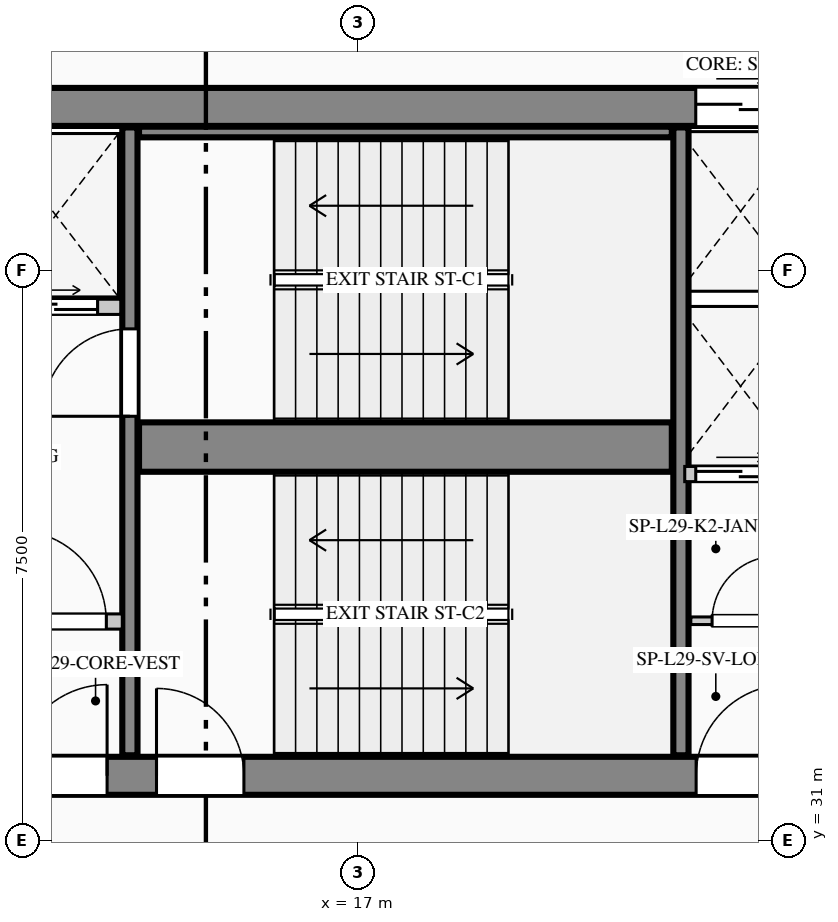
"""IFC4 building model, lengths in metres.
Left out: names, types, materials, properties, quantities, classifications, styles, units other than length and angle.
Written with IfcOpenShell. Run it as: python <this file> out.ifc"""

import sys

from ifc_helpers import new_model, si_unit, direction, frame, frame_2d, origin, place, context, subcontext, project, spatial, rectangle, extrude, element, fill, save


model = new_model("IFC4")
c1 = context("Model", 3, precision=1e-05, world=origin(), true_north=direction((0.0, 1.0)))
c2 = subcontext(c1, "Body", "Model", "MODEL_VIEW")
j1 = project(units=[si_unit("LENGTHUNIT", "METRE"), si_unit("PLANEANGLEUNIT", "RADIAN")], contexts=[c1])
p1 = place(None, origin())
s1 = spatial("IfcSite", under=j1, at=p1, CompositionType="ELEMENT")
p2 = place(p1, origin())
s2 = spatial("IfcBuilding", under=s1, at=p2, CompositionType="ELEMENT")
p3 = place(p2, frame((0.0, 0.0, 127.2)))
s3 = spatial("IfcBuildingStorey", under=s2, at=p3, CompositionType="ELEMENT", Elevation=127.2)
p4 = place(p3, frame((5.5, 40.65, 0.0), z_axis=(0.0, 0.0, 1.0), x_axis=(1.0, 0.0, 0.0)))
e1 = element("IfcWall", 1, at=p4, inside=s3, PredefinedType="SHEAR", context=c2, shape_type="SweptSolid", body=[
    extrude(rectangle(XDim=17.85, YDim=0.5, at=frame_2d((8.925, 0.0))), origin(), (0.0, 0.0, 1.0), 3.95),
])
p5 = place(p4, frame((15.945, 0.0, 0.0)))
e2 = element("IfcOpeningElement", 2, at=p5, cuts=e1, PredefinedType="OPENING", context=c2, shape_type="SweptSolid", body=[
    extrude(rectangle(XDim=1.18, YDim=2.25, at=frame_2d((0.59, 1.125))), frame((0.0, 0.26, 0.0), z_axis=(0.0, -1.0, 0.0), x_axis=(1.0, 0.0, 0.0)), (0.0, 0.0, 1.0), 0.52),
])
p6 = place(p3, frame((5.5, 31.85, 0.0), z_axis=(0.0, 0.0, 1.0), x_axis=(1.0, 0.0, 0.0)))
e3 = element("IfcWall", 3, at=p6, inside=s3, PredefinedType="SHEAR", context=c2, shape_type="SweptSolid", body=[
    extrude(rectangle(XDim=17.85, YDim=0.5, at=frame_2d((8.925, 0.0))), origin(), (0.0, 0.0, 1.0), 3.95),
])
p7 = place(p6, frame((3.15, 0.0, 0.0)))
e4 = element("IfcOpeningElement", 4, at=p7, cuts=e3, PredefinedType="OPENING", context=c2, shape_type="SweptSolid", body=[
    extrude(rectangle(XDim=1.2, YDim=2.2, at=frame_2d((0.6, 1.1))), frame((0.0, 0.26, 0.0), z_axis=(0.0, -1.0, 0.0), x_axis=(1.0, 0.0, 0.0)), (0.0, 0.0, 1.0), 0.52),
])
p8 = place(p6, frame((7.0, 0.0, 0.0)))
e5 = element("IfcOpeningElement", 5, at=p8, cuts=e3, PredefinedType="OPENING", context=c2, shape_type="SweptSolid", body=[
    extrude(rectangle(XDim=1.2, YDim=2.2, at=frame_2d((0.6, 1.1))), frame((0.0, 0.26, 0.0), z_axis=(0.0, -1.0, 0.0), x_axis=(1.0, 0.0, 0.0)), (0.0, 0.0, 1.0), 0.52),
])
p9 = place(p6, frame((8.85, 0.0, 0.0)))
e6 = element("IfcOpeningElement", 6, at=p9, cuts=e3, PredefinedType="OPENING", context=c2, shape_type="SweptSolid", body=[
    extrude(rectangle(XDim=1.15, YDim=2.2, at=frame_2d((0.575, 1.1))), frame((0.0, 0.26, 0.0), z_axis=(0.0, -1.0, 0.0), x_axis=(1.0, 0.0, 0.0)), (0.0, 0.0, 1.0), 0.52),
])
p10 = place(p6, frame((15.95, 0.0, 0.0)))
e7 = element("IfcOpeningElement", 7, at=p10, cuts=e3, PredefinedType="OPENING", context=c2, shape_type="SweptSolid", body=[
    extrude(rectangle(XDim=1.2, YDim=2.2, at=frame_2d((0.6, 1.1))), frame((0.0, 0.26, 0.0), z_axis=(0.0, -1.0, 0.0), x_axis=(1.0, 0.0, 0.0)), (0.0, 0.0, 1.0), 0.52),
])
p11 = place(p3, frame((14.0, 32.12, 0.0), z_axis=(0.0, 0.0, 1.0), x_axis=(0.0, 1.0, 0.0)))
e8 = element("IfcWall", 8, at=p11, inside=s3, PredefinedType="SHEAR", context=c2, shape_type="SweptSolid", body=[
    extrude(rectangle(XDim=8.26, YDim=0.2, at=frame_2d((4.13, 0.0))), origin(), (0.0, 0.0, 1.0), 3.95),
])
p12 = place(p11, frame((4.46, 0.0, 0.0)))
e9 = element("IfcOpeningElement", 9, at=p12, cuts=e8, PredefinedType="OPENING", context=c2, shape_type="SweptSolid", body=[
    extrude(rectangle(XDim=1.15, YDim=2.2, at=frame_2d((0.575, 1.1))), frame((0.0, 0.11, 0.0), z_axis=(0.0, -1.0, 0.0), x_axis=(1.0, 0.0, 0.0)), (0.0, 0.0, 1.0), 0.22),
])
p13 = place(p3, frame((14.12, 36.175, 0.0), z_axis=(0.0, 0.0, 1.0), x_axis=(1.0, 0.0, 0.0)))
e10 = element("IfcWall", 10, at=p13, inside=s3, PredefinedType="SHEAR", context=c2, shape_type="SweptSolid", body=[
    extrude(rectangle(XDim=7.01, YDim=0.65, at=frame_2d((3.505, 0.0))), origin(), (0.0, 0.0, 1.0), 3.95),
])
p14 = place(p3, frame((21.25, 32.12, 0.0), z_axis=(0.0, 0.0, 1.0), x_axis=(0.0, 1.0, 0.0)))
e11 = element("IfcWall", 11, at=p14, inside=s3, PredefinedType="SHEAR", context=c2, shape_type="SweptSolid", body=[
    extrude(rectangle(XDim=8.26, YDim=0.2, at=frame_2d((4.13, 0.0))), origin(), (0.0, 0.0, 1.0), 3.95),
])
p15 = place(p3, frame((14.12, 40.32, 0.0), z_axis=(0.0, 0.0, 1.0), x_axis=(1.0, 0.0, 0.0)))
e12 = element("IfcWall", 12, at=p15, inside=s3, PredefinedType="SHEAR", context=c2, shape_type="SweptSolid", body=[
    extrude(rectangle(XDim=7.01, YDim=0.14, at=frame_2d((3.505, 0.0))), origin(), (0.0, 0.0, 1.0), 3.95),
])
p16 = place(p3, frame((10.34, 38.02, 0.0), z_axis=(0.0, 0.0, 1.0), x_axis=(1.0, 0.0, 0.0)))
e13 = element("IfcWall", 13, at=p16, inside=s3, PredefinedType="PARTITIONING", context=c2, shape_type="SweptSolid", body=[
    extrude(rectangle(XDim=3.54, YDim=0.2, at=frame_2d((1.77, 0.0))), origin(), (0.0, 0.0, 1.0), 3.69),
])
p17 = place(p16, frame((0.285, 0.0, 0.0)))
e14 = element("IfcOpeningElement", 14, at=p17, cuts=e13, PredefinedType="OPENING", context=c2, shape_type="SweptSolid", body=[
    extrude(rectangle(XDim=1.1, YDim=2.2, at=frame_2d((0.55, 1.1))), frame((0.0, 0.11, 0.0), z_axis=(0.0, -1.0, 0.0), x_axis=(1.0, 0.0, 0.0)), (0.0, 0.0, 1.0), 0.22),
])
p18 = place(p16, frame((2.135, 0.0, 0.0)))
e15 = element("IfcOpeningElement", 15, at=p18, cuts=e13, PredefinedType="OPENING", context=c2, shape_type="SweptSolid", body=[
    extrude(rectangle(XDim=1.1, YDim=2.2, at=frame_2d((0.55, 1.1))), frame((0.0, 0.11, 0.0), z_axis=(0.0, -1.0, 0.0), x_axis=(1.0, 0.0, 0.0)), (0.0, 0.0, 1.0), 0.22),
])
p19 = place(p3, frame((10.34, 33.88, 0.0), z_axis=(0.0, 0.0, 1.0), x_axis=(1.0, 0.0, 0.0)))
e16 = element("IfcWall", 16, at=p19, inside=s3, PredefinedType="PARTITIONING", context=c2, shape_type="SweptSolid", body=[
    extrude(rectangle(XDim=3.56, YDim=0.2, at=frame_2d((1.78, 0.0))), origin(), (0.0, 0.0, 1.0), 3.69),
])
p20 = place(p19, frame((2.15, 0.0, 0.0)))
e17 = element("IfcOpeningElement", 17, at=p20, cuts=e16, PredefinedType="OPENING", context=c2, shape_type="SweptSolid", body=[
    extrude(rectangle(XDim=1.2, YDim=2.2, at=frame_2d((0.6, 1.1))), frame((0.0, 0.11, 0.0), z_axis=(0.0, -1.0, 0.0), x_axis=(1.0, 0.0, 0.0)), (0.0, 0.0, 1.0), 0.22),
])
p21 = place(p3, frame((21.38, 33.89, 0.0), z_axis=(0.0, 0.0, 1.0), x_axis=(1.0, 0.0, 0.0)))
e18 = element("IfcWall", 18, at=p21, inside=s3, PredefinedType="PARTITIONING", context=c2, shape_type="SweptSolid", body=[
    extrude(rectangle(XDim=1.42, YDim=0.1, at=frame_2d((0.71, 0.0))), origin(), (0.0, 0.0, 1.0), 3.69),
])
p22 = place(p21, frame((0.28, 0.0, 0.0)))
e19 = element("IfcOpeningElement", 19, at=p22, cuts=e18, PredefinedType="OPENING", context=c2, shape_type="SweptSolid", body=[
    extrude(rectangle(XDim=0.85, YDim=2.1, at=frame_2d((0.425, 1.05))), frame((0.0, 0.06, 0.0), z_axis=(0.0, -1.0, 0.0), x_axis=(1.0, 0.0, 0.0)), (0.0, 0.0, 1.0), 0.12),
])
p23 = place(p3, frame((21.3, 35.82, 0.0), z_axis=(0.0, 0.0, 1.0), x_axis=(1.0, 0.0, 0.0)))
e20 = element("IfcWall", 20, at=p23, inside=s3, PredefinedType="PARTITIONING", context=c2, shape_type="SweptSolid", body=[
    extrude(rectangle(XDim=1.5, YDim=0.2, at=frame_2d((0.75, 0.0))), origin(), (0.0, 0.0, 1.0), 3.69),
])
p24 = place(p23, frame((0.145, 0.0, 0.0)))
e21 = element("IfcOpeningElement", 21, at=p24, cuts=e20, PredefinedType="OPENING", context=c2, shape_type="SweptSolid", body=[
    extrude(rectangle(XDim=1.18, YDim=2.25, at=frame_2d((0.59, 1.125))), frame((0.0, 0.11, 0.0), z_axis=(0.0, -1.0, 0.0), x_axis=(1.0, 0.0, 0.0)), (0.0, 0.0, 1.0), 0.22),
])
p25 = place(p8, origin())
e22 = element("IfcDoor", 22, at=p25, inside=s3, OperationType="SINGLE_SWING_RIGHT", PredefinedType="DOOR", context=c2, shape_type="SweptSolid", body=[
    extrude(rectangle(XDim=1.2, YDim=2.2, at=frame_2d((0.6, 1.1))), frame((0.0, 0.025, 0.0), z_axis=(0.0, -1.0, 0.0), x_axis=(1.0, 0.0, 0.0)), (0.0, 0.0, 1.0), 0.05),
])
fill(e5, e22)
p26 = place(p9, origin())
e23 = element("IfcDoor", 23, at=p26, inside=s3, OperationType="SINGLE_SWING_LEFT", PredefinedType="DOOR", context=c2, shape_type="SweptSolid", body=[
    extrude(rectangle(XDim=1.15, YDim=2.2, at=frame_2d((0.575, 1.1))), frame((0.0, 0.025, 0.0), z_axis=(0.0, -1.0, 0.0), x_axis=(1.0, 0.0, 0.0)), (0.0, 0.0, 1.0), 0.05),
])
fill(e6, e23)
p27 = place(p10, origin())
e24 = element("IfcDoor", 24, at=p27, inside=s3, OperationType="SINGLE_SWING_RIGHT", PredefinedType="DOOR", context=c2, shape_type="SweptSolid", body=[
    extrude(rectangle(XDim=1.2, YDim=2.2, at=frame_2d((0.6, 1.1))), frame((0.0, 0.025, 0.0), z_axis=(0.0, -1.0, 0.0), x_axis=(1.0, 0.0, 0.0)), (0.0, 0.0, 1.0), 0.05),
])
fill(e7, e24)
p28 = place(p20, origin())
e25 = element("IfcDoor", 25, at=p28, inside=s3, OperationType="SINGLE_SWING_LEFT", PredefinedType="DOOR", context=c2, shape_type="SweptSolid", body=[
    extrude(rectangle(XDim=1.2, YDim=2.2, at=frame_2d((0.6, 1.1))), frame((0.0, 0.025, 0.0), z_axis=(0.0, -1.0, 0.0), x_axis=(1.0, 0.0, 0.0)), (0.0, 0.0, 1.0), 0.05),
])
fill(e17, e25)
p29 = place(p22, origin())
e26 = element("IfcDoor", 26, at=p29, inside=s3, OperationType="SINGLE_SWING_RIGHT", PredefinedType="DOOR", context=c2, shape_type="SweptSolid", body=[
    extrude(rectangle(XDim=0.85, YDim=2.1, at=frame_2d((0.425, 1.05))), frame((0.0, 0.025, 0.0), z_axis=(0.0, -1.0, 0.0), x_axis=(1.0, 0.0, 0.0)), (0.0, 0.0, 1.0), 0.05),
])
fill(e19, e26)
p30 = place(p12, origin())
e27 = element("IfcDoor", 27, at=p30, inside=s3, OperationType="SINGLE_SWING_LEFT", PredefinedType="DOOR", context=c2, shape_type="SweptSolid", body=[
    extrude(rectangle(XDim=1.15, YDim=2.2, at=frame_2d((0.575, 1.1))), frame((0.0, 0.025, 0.0), z_axis=(0.0, -1.0, 0.0), x_axis=(1.0, 0.0, 0.0)), (0.0, 0.0, 1.0), 0.05),
])
fill(e9, e27)
p31 = place(p18, origin())
e28 = element("IfcDoor", 28, at=p31, inside=s3, OperationType="DOUBLE_DOOR_SLIDING", PredefinedType="DOOR", context=c2, shape_type="SweptSolid", body=[
    extrude(rectangle(XDim=1.1, YDim=2.2, at=frame_2d((0.55, 1.1))), frame((0.0, 0.025, 0.0), z_axis=(0.0, -1.0, 0.0), x_axis=(1.0, 0.0, 0.0)), (0.0, 0.0, 1.0), 0.05),
])
fill(e15, e28)
p32 = place(p5, origin())
e29 = element("IfcDoor", 29, at=p32, inside=s3, OperationType="DOUBLE_DOOR_SLIDING", PredefinedType="DOOR", context=c2, shape_type="SweptSolid", body=[
    extrude(rectangle(XDim=1.18, YDim=2.25, at=frame_2d((0.59, 1.125))), frame((0.0, 0.025, 0.0), z_axis=(0.0, -1.0, 0.0), x_axis=(1.0, 0.0, 0.0)), (0.0, 0.0, 1.0), 0.05),
])
fill(e2, e29)
p33 = place(p24, origin())
e30 = element("IfcDoor", 30, at=p33, inside=s3, OperationType="DOUBLE_DOOR_SLIDING", PredefinedType="DOOR", context=c2, shape_type="SweptSolid", body=[
    extrude(rectangle(XDim=1.18, YDim=2.25, at=frame_2d((0.59, 1.125))), frame((0.0, 0.025, 0.0), z_axis=(0.0, -1.0, 0.0), x_axis=(1.0, 0.0, 0.0)), (0.0, 0.0, 1.0), 0.05),
])
fill(e21, e30)
save(model, sys.argv[1])
